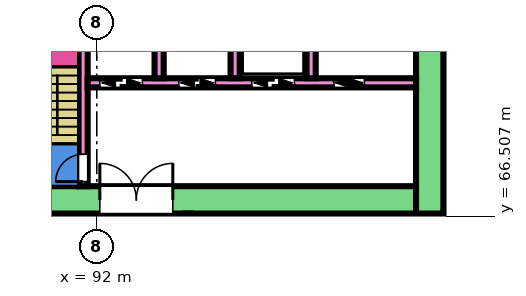
"""IFC4 building model, lengths in metres.
Left out: names, types, materials, properties, quantities, classifications, styles, units other than length and angle.
Written with IfcOpenShell. Run it as: python <this file> out.ifc"""

import sys

from ifc_helpers import new_model, si_unit, direction, frame, frame_2d, origin, place, context, subcontext, project, spatial, rectangle, extrude, element, fill, save


model = new_model("IFC4")
c1 = context("Model", 3, precision=1e-05, world=origin(), true_north=direction((0.0, 1.0)))
c2 = subcontext(c1, "Body", "Model", "MODEL_VIEW")
j1 = project(units=[si_unit("LENGTHUNIT", "METRE"), si_unit("PLANEANGLEUNIT", "RADIAN")], contexts=[c1])
p1 = place(None, origin())
s1 = spatial("IfcSite", under=j1, at=p1, CompositionType="ELEMENT")
p2 = place(p1, origin())
s2 = spatial("IfcBuilding", under=s1, at=p2, CompositionType="ELEMENT")
p3 = place(p2, origin())
s3 = spatial("IfcBuildingStorey", under=s2, at=p3, CompositionType="ELEMENT", Elevation=0.0)
p4 = place(p3, frame((87.9, 67.05, 0.0), z_axis=(0.0, 0.0, 1.0), x_axis=(1.0, 0.0, 0.0)))
e1 = element("IfcWall", 1, at=p4, inside=s3, PredefinedType="SHEAR", context=c2, shape_type="SweptSolid", body=[
    extrude(rectangle(XDim=14.6, YDim=0.9, at=frame_2d((7.3, 0.0))), origin(), (0.0, 0.0, 1.0), 6.55),
])
p5 = place(p4, frame((4.2, 0.0, 0.0)))
e2 = element("IfcOpeningElement", 2, at=p5, cuts=e1, PredefinedType="OPENING", context=c2, shape_type="SweptSolid", body=[
    extrude(rectangle(XDim=2.4, YDim=2.4, at=frame_2d((1.2, 1.2))), frame((0.0, 0.46, 0.0), z_axis=(0.0, -1.0, 0.0), x_axis=(1.0, 0.0, 0.0)), (0.0, 0.0, 1.0), 0.92),
])
p6 = place(p3, frame((102.95, 66.6, 0.0), z_axis=(0.0, 0.0, 1.0), x_axis=(0.0, 1.0, 0.0)))
e3 = element("IfcWall", 3, at=p6, inside=s3, PredefinedType="SHEAR", context=c2, shape_type="SweptSolid", body=[
    extrude(rectangle(XDim=16.8, YDim=0.9, at=frame_2d((8.4, 0.0))), origin(), (0.0, 0.0, 1.0), 6.55),
])
p7 = place(p3, frame((91.55, 67.5, 0.0), z_axis=(0.0, 0.0, 1.0), x_axis=(0.0, 1.0, 0.0)))
e4 = element("IfcWall", 4, at=p7, inside=s3, PredefinedType="SHEAR", context=c2, shape_type="SweptSolid", body=[
    extrude(rectangle(XDim=7.5, YDim=0.3, at=frame_2d((3.75, 0.0))), origin(), (0.0, 0.0, 1.0), 6.55),
])
p8 = place(p7, frame((0.15, 0.0, 0.0)))
e5 = element("IfcOpeningElement", 5, at=p8, cuts=e4, PredefinedType="OPENING", context=c2, shape_type="SweptSolid", body=[
    extrude(rectangle(XDim=0.9, YDim=2.1, at=frame_2d((0.45, 1.05))), frame((0.0, 0.16, 0.0), z_axis=(0.0, -1.0, 0.0), x_axis=(1.0, 0.0, 0.0)), (0.0, 0.0, 1.0), 0.32),
])
p9 = place(p3, frame((91.7, 70.9, 0.0), z_axis=(0.0, 0.0, 1.0), x_axis=(1.0, 0.0, 0.0)))
e6 = element("IfcWall", 6, at=p9, inside=s3, PredefinedType="SHEAR", context=c2, shape_type="SweptSolid", body=[
    extrude(rectangle(XDim=10.8, YDim=0.3, at=frame_2d((5.4, 0.0))), origin(), (0.0, 0.0, 1.0), 6.55),
])
p10 = place(p9, frame((0.4, 0.0, 0.0)))
e7 = element("IfcOpeningElement", 7, at=p10, cuts=e6, PredefinedType="OPENING", context=c2, shape_type="SweptSolid", body=[
    extrude(rectangle(XDim=1.4, YDim=2.1, at=frame_2d((0.7, 1.05))), frame((0.0, 0.16, 0.0), z_axis=(0.0, -1.0, 0.0), x_axis=(1.0, 0.0, 0.0)), (0.0, 0.0, 1.0), 0.32),
])
p11 = place(p9, frame((3.0, 0.0, 0.0)))
e8 = element("IfcOpeningElement", 8, at=p11, cuts=e6, PredefinedType="OPENING", context=c2, shape_type="SweptSolid", body=[
    extrude(rectangle(XDim=1.2, YDim=2.1, at=frame_2d((0.6, 1.05))), frame((0.0, 0.16, 0.0), z_axis=(0.0, -1.0, 0.0), x_axis=(1.0, 0.0, 0.0)), (0.0, 0.0, 1.0), 0.32),
])
p12 = place(p9, frame((5.4, 0.0, 0.0)))
e9 = element("IfcOpeningElement", 9, at=p12, cuts=e6, PredefinedType="OPENING", context=c2, shape_type="SweptSolid", body=[
    extrude(rectangle(XDim=1.4, YDim=2.1, at=frame_2d((0.7, 1.05))), frame((0.0, 0.16, 0.0), z_axis=(0.0, -1.0, 0.0), x_axis=(1.0, 0.0, 0.0)), (0.0, 0.0, 1.0), 0.32),
])
p13 = place(p9, frame((8.1, 0.0, 0.0)))
e10 = element("IfcOpeningElement", 10, at=p13, cuts=e6, PredefinedType="OPENING", context=c2, shape_type="SweptSolid", body=[
    extrude(rectangle(XDim=1.0, YDim=2.1, at=frame_2d((0.5, 1.05))), frame((0.0, 0.16, 0.0), z_axis=(0.0, -1.0, 0.0), x_axis=(1.0, 0.0, 0.0)), (0.0, 0.0, 1.0), 0.32),
])
for number, where, z_axis, x_axis in (
    (11, (94.05, 71.05, 0.0), (0.0, 0.0, 1.0), (0.0, 1.0, 0.0)),
    (12, (96.55, 71.05, 0.0), (0.0, 0.0, 1.0), (0.0, 1.0, 0.0)),
    (13, (99.05, 71.05, 0.0), (0.0, 0.0, 1.0), (0.0, 1.0, 0.0)),
):
    element("IfcWall", number, at=place(p3, frame(where, z_axis=z_axis, x_axis=x_axis)), inside=s3, PredefinedType="SHEAR", context=c2, shape_type="SweptSolid", body=[
        extrude(rectangle(XDim=2.55, YDim=0.3, at=frame_2d((1.275, 0.0))), origin(), (0.0, 0.0, 1.0), 6.55),
    ])
p14 = place(p3, frame((95.0, 65.1, 0.0), z_axis=(0.0, 0.0, 1.0), x_axis=(0.0, 1.0, 0.0)))
e14 = element("IfcWall", 14, at=p14, inside=s3, PredefinedType="PARTITIONING", context=c2, shape_type="SweptSolid", body=[
    extrude(rectangle(XDim=1.499, YDim=0.2, at=frame_2d((0.75, 0.0))), origin(), (0.0, 0.0, 1.0), 6.55),
])
p15 = place(p8, origin())
e15 = element("IfcDoor", 15, at=p15, inside=s3, OperationType="SINGLE_SWING_LEFT", PredefinedType="DOOR", context=c2, shape_type="SweptSolid", body=[
    extrude(rectangle(XDim=0.9, YDim=2.1, at=frame_2d((0.45, 1.05))), frame((0.0, 0.025, 0.0), z_axis=(0.0, -1.0, 0.0), x_axis=(1.0, 0.0, 0.0)), (0.0, 0.0, 1.0), 0.05),
])
fill(e5, e15)
p16 = place(p10, origin())
e16 = element("IfcDoor", 16, at=p16, inside=s3, OperationType="DOUBLE_DOOR_SLIDING", PredefinedType="DOOR", context=c2, shape_type="SweptSolid", body=[
    extrude(rectangle(XDim=1.4, YDim=2.1, at=frame_2d((0.7, 1.05))), frame((0.0, 0.025, 0.0), z_axis=(0.0, -1.0, 0.0), x_axis=(1.0, 0.0, 0.0)), (0.0, 0.0, 1.0), 0.05),
])
fill(e7, e16)
p17 = place(p11, origin())
e17 = element("IfcDoor", 17, at=p17, inside=s3, OperationType="DOUBLE_DOOR_SLIDING", PredefinedType="DOOR", context=c2, shape_type="SweptSolid", body=[
    extrude(rectangle(XDim=1.2, YDim=2.1, at=frame_2d((0.6, 1.05))), frame((0.0, 0.025, 0.0), z_axis=(0.0, -1.0, 0.0), x_axis=(1.0, 0.0, 0.0)), (0.0, 0.0, 1.0), 0.05),
])
fill(e8, e17)
p18 = place(p12, origin())
e18 = element("IfcDoor", 18, at=p18, inside=s3, OperationType="DOUBLE_DOOR_SLIDING", PredefinedType="DOOR", context=c2, shape_type="SweptSolid", body=[
    extrude(rectangle(XDim=1.4, YDim=2.1, at=frame_2d((0.7, 1.05))), frame((0.0, 0.025, 0.0), z_axis=(0.0, -1.0, 0.0), x_axis=(1.0, 0.0, 0.0)), (0.0, 0.0, 1.0), 0.05),
])
fill(e9, e18)
p19 = place(p13, origin())
e19 = element("IfcDoor", 19, at=p19, inside=s3, OperationType="DOUBLE_DOOR_SLIDING", PredefinedType="DOOR", context=c2, shape_type="SweptSolid", body=[
    extrude(rectangle(XDim=1.0, YDim=2.1, at=frame_2d((0.5, 1.05))), frame((0.0, 0.025, 0.0), z_axis=(0.0, -1.0, 0.0), x_axis=(1.0, 0.0, 0.0)), (0.0, 0.0, 1.0), 0.05),
])
fill(e10, e19)
p20 = place(p5, origin())
e20 = element("IfcDoor", 20, at=p20, inside=s3, OperationType="DOUBLE_DOOR_SINGLE_SWING", PredefinedType="DOOR", context=c2, shape_type="SweptSolid", body=[
    extrude(rectangle(XDim=2.4, YDim=2.4, at=frame_2d((1.2, 1.2))), frame((0.0, 0.025, 0.0), z_axis=(0.0, -1.0, 0.0), x_axis=(1.0, 0.0, 0.0)), (0.0, 0.0, 1.0), 0.05),
])
fill(e2, e20)
save(model, sys.argv[1])
